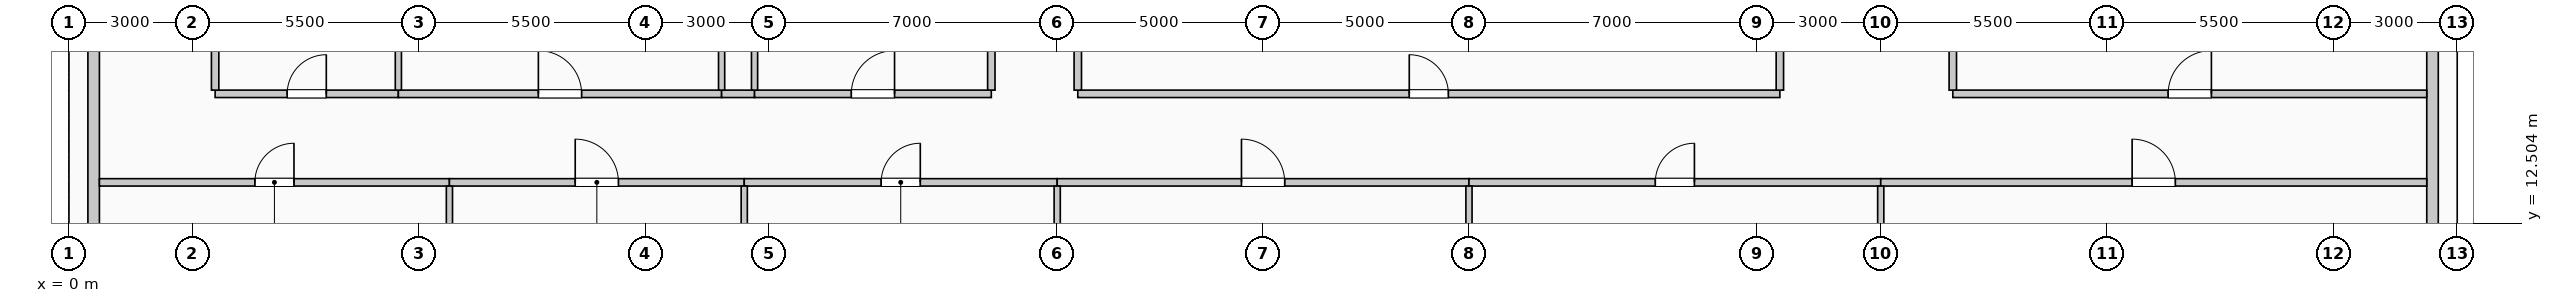
"""IFC4 building model, lengths in metres.
Left out: names, types, materials, properties, quantities, classifications, styles, units other than length and angle.
Written with IfcOpenShell. Run it as: python <this file> out.ifc"""

import sys

from ifc_helpers import new_model, si_unit, direction, frame, frame_2d, origin, place, context, subcontext, project, spatial, rectangle, extrude, element, fill, save


model = new_model("IFC4")
c1 = context("Model", 3, precision=1e-05, world=origin(), true_north=direction((0.0, 1.0)))
c2 = subcontext(c1, "Body", "Model", "MODEL_VIEW")
j1 = project(units=[si_unit("LENGTHUNIT", "METRE"), si_unit("PLANEANGLEUNIT", "RADIAN")], contexts=[c1])
p1 = place(None, origin())
s1 = spatial("IfcSite", under=j1, at=p1, CompositionType="ELEMENT")
p2 = place(p1, origin())
s2 = spatial("IfcBuilding", under=s1, at=p2, CompositionType="ELEMENT")
p3 = place(p2, frame((0.0, 0.0, 132.6)))
s3 = spatial("IfcBuildingStorey", under=s2, at=p3, CompositionType="ELEMENT", Elevation=132.6)
for number, where, z_axis, x_axis in (
    (1, (0.6, 10.445, 0.0), (0.0, 0.0, 1.0), (0.0, 1.0, 0.0)),
    (2, (57.4, 17.555, 0.0), (0.0, 0.0, 1.0), (0.0, -1.0, 0.0)),
):
    element("IfcWall", number, at=place(p3, frame(where, z_axis=z_axis, x_axis=x_axis)), inside=s3, PredefinedType="SOLIDWALL", context=c2, shape_type="SweptSolid", body=[
        extrude(rectangle(XDim=7.11, YDim=0.28, at=frame_2d((3.555, 0.0))), origin(), (0.0, 0.0, 1.0), 2.875),
    ])
p4 = place(p3, frame((0.74, 13.5, 0.0), z_axis=(0.0, 0.0, 1.0), x_axis=(1.0, 0.0, 0.0)))
e3 = element("IfcWall", 3, at=p4, inside=s3, PredefinedType="PARTITIONING", context=c2, shape_type="SweptSolid", body=[
    extrude(rectangle(XDim=8.5, YDim=0.18, at=frame_2d((4.25, 0.0))), origin(), (0.0, 0.0, 1.0), 3.725),
])
p5 = place(p4, frame((3.775, 0.0, 0.0)))
e4 = element("IfcOpeningElement", 4, at=p5, cuts=e3, PredefinedType="OPENING", context=c2, shape_type="SweptSolid", body=[
    extrude(rectangle(XDim=0.95, YDim=2.15, at=frame_2d((0.475, 1.075))), frame((0.0, 0.1, 0.0), z_axis=(0.0, -1.0, 0.0), x_axis=(1.0, 0.0, 0.0)), (0.0, 0.0, 1.0), 0.2),
])
p6 = place(p3, frame((9.24, 13.5, 0.0), z_axis=(0.0, 0.0, 1.0), x_axis=(1.0, 0.0, 0.0)))
e5 = element("IfcWall", 5, at=p6, inside=s3, PredefinedType="PARTITIONING", context=c2, shape_type="SweptSolid", body=[
    extrude(rectangle(XDim=7.16, YDim=0.18, at=frame_2d((3.58, 0.0))), origin(), (0.0, 0.0, 1.0), 3.725),
])
p7 = place(p6, frame((3.055, 0.0, 0.0)))
e6 = element("IfcOpeningElement", 6, at=p7, cuts=e5, PredefinedType="OPENING", context=c2, shape_type="SweptSolid", body=[
    extrude(rectangle(XDim=1.05, YDim=2.15, at=frame_2d((0.525, 1.075))), frame((0.0, 0.1, 0.0), z_axis=(0.0, -1.0, 0.0), x_axis=(1.0, 0.0, 0.0)), (0.0, 0.0, 1.0), 0.2),
])
p8 = place(p3, frame((16.4, 13.5, 0.0), z_axis=(0.0, 0.0, 1.0), x_axis=(1.0, 0.0, 0.0)))
e7 = element("IfcWall", 7, at=p8, inside=s3, PredefinedType="PARTITIONING", context=c2, shape_type="SweptSolid", body=[
    extrude(rectangle(XDim=7.6, YDim=0.18, at=frame_2d((3.8, 0.0))), origin(), (0.0, 0.0, 1.0), 3.725),
])
p9 = place(p8, frame((3.325, 0.0, 0.0)))
e8 = element("IfcOpeningElement", 8, at=p9, cuts=e7, PredefinedType="OPENING", context=c2, shape_type="SweptSolid", body=[
    extrude(rectangle(XDim=0.95, YDim=2.15, at=frame_2d((0.475, 1.075))), frame((0.0, 0.1, 0.0), z_axis=(0.0, -1.0, 0.0), x_axis=(1.0, 0.0, 0.0)), (0.0, 0.0, 1.0), 0.2),
])
p10 = place(p3, frame((24.0, 13.5, 0.0), z_axis=(0.0, 0.0, 1.0), x_axis=(1.0, 0.0, 0.0)))
e9 = element("IfcWall", 9, at=p10, inside=s3, PredefinedType="PARTITIONING", context=c2, shape_type="SweptSolid", body=[
    extrude(rectangle(XDim=10.0, YDim=0.18, at=frame_2d((5.0, 0.0))), origin(), (0.0, 0.0, 1.0), 3.725),
])
p11 = place(p10, frame((4.475, 0.0, 0.0)))
e10 = element("IfcOpeningElement", 10, at=p11, cuts=e9, PredefinedType="OPENING", context=c2, shape_type="SweptSolid", body=[
    extrude(rectangle(XDim=1.05, YDim=2.15, at=frame_2d((0.525, 1.075))), frame((0.0, 0.1, 0.0), z_axis=(0.0, -1.0, 0.0), x_axis=(1.0, 0.0, 0.0)), (0.0, 0.0, 1.0), 0.2),
])
p12 = place(p3, frame((34.0, 13.5, 0.0), z_axis=(0.0, 0.0, 1.0), x_axis=(1.0, 0.0, 0.0)))
e11 = element("IfcWall", 11, at=p12, inside=s3, PredefinedType="PARTITIONING", context=c2, shape_type="SweptSolid", body=[
    extrude(rectangle(XDim=10.0, YDim=0.18, at=frame_2d((5.0, 0.0))), origin(), (0.0, 0.0, 1.0), 3.725),
])
p13 = place(p12, frame((4.525, 0.0, 0.0)))
e12 = element("IfcOpeningElement", 12, at=p13, cuts=e11, PredefinedType="OPENING", context=c2, shape_type="SweptSolid", body=[
    extrude(rectangle(XDim=0.95, YDim=2.15, at=frame_2d((0.475, 1.075))), frame((0.0, 0.1, 0.0), z_axis=(0.0, -1.0, 0.0), x_axis=(1.0, 0.0, 0.0)), (0.0, 0.0, 1.0), 0.2),
])
p14 = place(p3, frame((44.0, 13.5, 0.0), z_axis=(0.0, 0.0, 1.0), x_axis=(1.0, 0.0, 0.0)))
e13 = element("IfcWall", 13, at=p14, inside=s3, PredefinedType="PARTITIONING", context=c2, shape_type="SweptSolid", body=[
    extrude(rectangle(XDim=13.26, YDim=0.18, at=frame_2d((6.63, 0.0))), origin(), (0.0, 0.0, 1.0), 3.725),
])
p15 = place(p14, frame((6.105, 0.0, 0.0)))
e14 = element("IfcOpeningElement", 14, at=p15, cuts=e13, PredefinedType="OPENING", context=c2, shape_type="SweptSolid", body=[
    extrude(rectangle(XDim=1.05, YDim=2.15, at=frame_2d((0.525, 1.075))), frame((0.0, 0.1, 0.0), z_axis=(0.0, -1.0, 0.0), x_axis=(1.0, 0.0, 0.0)), (0.0, 0.0, 1.0), 0.2),
])
p16 = place(p3, frame((3.55, 15.65, 0.0), z_axis=(0.0, 0.0, 1.0), x_axis=(1.0, 0.0, 0.0)))
e15 = element("IfcWall", 15, at=p16, inside=s3, PredefinedType="PARTITIONING", context=c2, shape_type="SweptSolid", body=[
    extrude(rectangle(XDim=4.45, YDim=0.18, at=frame_2d((2.225, 0.0))), origin(), (0.0, 0.0, 1.0), 3.725),
])
p17 = place(p16, frame((1.75, 0.0, 0.0)))
e16 = element("IfcOpeningElement", 16, at=p17, cuts=e15, PredefinedType="OPENING", context=c2, shape_type="SweptSolid", body=[
    extrude(rectangle(XDim=0.95, YDim=2.15, at=frame_2d((0.475, 1.075))), frame((0.0, 0.1, 0.0), z_axis=(0.0, -1.0, 0.0), x_axis=(1.0, 0.0, 0.0)), (0.0, 0.0, 1.0), 0.2),
])
p18 = place(p3, frame((8.0, 15.65, 0.0), z_axis=(0.0, 0.0, 1.0), x_axis=(1.0, 0.0, 0.0)))
e17 = element("IfcWall", 17, at=p18, inside=s3, PredefinedType="PARTITIONING", context=c2, shape_type="SweptSolid", body=[
    extrude(rectangle(XDim=7.85, YDim=0.18, at=frame_2d((3.925, 0.0))), origin(), (0.0, 0.0, 1.0), 3.725),
])
p19 = place(p18, frame((3.4, 0.0, 0.0)))
e18 = element("IfcOpeningElement", 18, at=p19, cuts=e17, PredefinedType="OPENING", context=c2, shape_type="SweptSolid", body=[
    extrude(rectangle(XDim=1.05, YDim=2.15, at=frame_2d((0.525, 1.075))), frame((0.0, 0.1, 0.0), z_axis=(0.0, -1.0, 0.0), x_axis=(1.0, 0.0, 0.0)), (0.0, 0.0, 1.0), 0.2),
])
p20 = place(p3, frame((15.85, 15.65, 0.0), z_axis=(0.0, 0.0, 1.0), x_axis=(1.0, 0.0, 0.0)))
e19 = element("IfcWall", 19, at=p20, inside=s3, PredefinedType="PARTITIONING", context=c2, shape_type="SweptSolid", body=[
    extrude(rectangle(XDim=0.8, YDim=0.18, at=frame_2d((0.4, 0.0))), origin(), (0.0, 0.0, 1.0), 3.725),
])
p21 = place(p3, frame((16.65, 15.65, 0.0), z_axis=(0.0, 0.0, 1.0), x_axis=(1.0, 0.0, 0.0)))
e20 = element("IfcWall", 20, at=p21, inside=s3, PredefinedType="PARTITIONING", context=c2, shape_type="SweptSolid", body=[
    extrude(rectangle(XDim=5.75, YDim=0.18, at=frame_2d((2.875, 0.0))), origin(), (0.0, 0.0, 1.0), 3.725),
])
p22 = place(p21, frame((2.35, 0.0, 0.0)))
e21 = element("IfcOpeningElement", 21, at=p22, cuts=e20, PredefinedType="OPENING", context=c2, shape_type="SweptSolid", body=[
    extrude(rectangle(XDim=1.05, YDim=2.15, at=frame_2d((0.525, 1.075))), frame((0.0, 0.1, 0.0), z_axis=(0.0, -1.0, 0.0), x_axis=(1.0, 0.0, 0.0)), (0.0, 0.0, 1.0), 0.2),
])
p23 = place(p3, frame((24.5, 15.65, 0.0), z_axis=(0.0, 0.0, 1.0), x_axis=(1.0, 0.0, 0.0)))
e22 = element("IfcWall", 22, at=p23, inside=s3, PredefinedType="PARTITIONING", context=c2, shape_type="SweptSolid", body=[
    extrude(rectangle(XDim=17.05, YDim=0.18, at=frame_2d((8.525, 0.0))), origin(), (0.0, 0.0, 1.0), 3.725),
])
p24 = place(p23, frame((8.05, 0.0, 0.0)))
e23 = element("IfcOpeningElement", 23, at=p24, cuts=e22, PredefinedType="OPENING", context=c2, shape_type="SweptSolid", body=[
    extrude(rectangle(XDim=0.95, YDim=2.15, at=frame_2d((0.475, 1.075))), frame((0.0, 0.1, 0.0), z_axis=(0.0, -1.0, 0.0), x_axis=(1.0, 0.0, 0.0)), (0.0, 0.0, 1.0), 0.2),
])
p25 = place(p3, frame((45.75, 15.65, 0.0), z_axis=(0.0, 0.0, 1.0), x_axis=(1.0, 0.0, 0.0)))
e24 = element("IfcWall", 24, at=p25, inside=s3, PredefinedType="PARTITIONING", context=c2, shape_type="SweptSolid", body=[
    extrude(rectangle(XDim=11.51, YDim=0.18, at=frame_2d((5.755, 0.0))), origin(), (0.0, 0.0, 1.0), 3.725),
])
p26 = place(p25, frame((5.23, 0.0, 0.0)))
e25 = element("IfcOpeningElement", 25, at=p26, cuts=e24, PredefinedType="OPENING", context=c2, shape_type="SweptSolid", body=[
    extrude(rectangle(XDim=1.05, YDim=2.15, at=frame_2d((0.525, 1.075))), frame((0.0, 0.1, 0.0), z_axis=(0.0, -1.0, 0.0), x_axis=(1.0, 0.0, 0.0)), (0.0, 0.0, 1.0), 0.2),
])
p27 = place(p3, frame((3.55, 15.74, 0.0), z_axis=(0.0, 0.0, 1.0), x_axis=(0.0, 1.0, 0.0)))
e26 = element("IfcWall", 26, at=p27, inside=s3, PredefinedType="PARTITIONING", context=c2, shape_type="SweptSolid", body=[
    extrude(rectangle(XDim=3.135, YDim=0.18, at=frame_2d((1.567, 0.0))), origin(), (0.0, 0.0, 1.0), 3.725),
])
p28 = place(p3, frame((8.0, 15.74, 0.0), z_axis=(0.0, 0.0, 1.0), x_axis=(0.0, 1.0, 0.0)))
e27 = element("IfcWall", 27, at=p28, inside=s3, PredefinedType="PARTITIONING", context=c2, shape_type="SweptSolid", body=[
    extrude(rectangle(XDim=3.135, YDim=0.15, at=frame_2d((1.567, 0.0))), origin(), (0.0, 0.0, 1.0), 3.725),
])
p29 = place(p3, frame((9.24, 0.74, 0.0), z_axis=(0.0, 0.0, 1.0), x_axis=(0.0, 1.0, 0.0)))
e28 = element("IfcWall", 28, at=p29, inside=s3, PredefinedType="PARTITIONING", context=c2, shape_type="SweptSolid", body=[
    extrude(rectangle(XDim=12.67, YDim=0.15, at=frame_2d((6.335, 0.0))), origin(), (0.0, 0.0, 1.0), 3.725),
])
p30 = place(p3, frame((15.85, 15.74, 0.0), z_axis=(0.0, 0.0, 1.0), x_axis=(0.0, 1.0, 0.0)))
e29 = element("IfcWall", 29, at=p30, inside=s3, PredefinedType="PARTITIONING", context=c2, shape_type="SweptSolid", body=[
    extrude(rectangle(XDim=1.76, YDim=0.15, at=frame_2d((0.88, 0.0))), origin(), (0.0, 0.0, 1.0), 3.725),
])
p31 = place(p3, frame((16.4, 1.3, 0.0), z_axis=(0.0, 0.0, 1.0), x_axis=(0.0, 1.0, 0.0)))
e30 = element("IfcWall", 30, at=p31, inside=s3, PredefinedType="PARTITIONING", context=c2, shape_type="SweptSolid", body=[
    extrude(rectangle(XDim=12.11, YDim=0.15, at=frame_2d((6.055, 0.0))), origin(), (0.0, 0.0, 1.0), 3.07),
])
p32 = place(p3, frame((16.65, 15.74, 0.0), z_axis=(0.0, 0.0, 1.0), x_axis=(0.0, 1.0, 0.0)))
e31 = element("IfcWall", 31, at=p32, inside=s3, PredefinedType="PARTITIONING", context=c2, shape_type="SweptSolid", body=[
    extrude(rectangle(XDim=1.76, YDim=0.15, at=frame_2d((0.88, 0.0))), origin(), (0.0, 0.0, 1.0), 3.07),
])
p33 = place(p3, frame((22.4, 15.74, 0.0), z_axis=(0.0, 0.0, 1.0), x_axis=(0.0, 1.0, 0.0)))
e32 = element("IfcWall", 32, at=p33, inside=s3, PredefinedType="PARTITIONING", context=c2, shape_type="SweptSolid", body=[
    extrude(rectangle(XDim=13.985, YDim=0.18, at=frame_2d((6.993, 0.0))), origin(), (0.0, 0.0, 1.0), 3.725),
])
p34 = place(p3, frame((24.0, 1.3, 0.0), z_axis=(0.0, 0.0, 1.0), x_axis=(0.0, 1.0, 0.0)))
e33 = element("IfcWall", 33, at=p34, inside=s3, PredefinedType="PARTITIONING", context=c2, shape_type="SweptSolid", body=[
    extrude(rectangle(XDim=12.11, YDim=0.15, at=frame_2d((6.055, 0.0))), origin(), (0.0, 0.0, 1.0), 3.725),
])
p35 = place(p3, frame((24.5, 15.74, 0.0), z_axis=(0.0, 0.0, 1.0), x_axis=(0.0, 1.0, 0.0)))
e34 = element("IfcWall", 34, at=p35, inside=s3, PredefinedType="PARTITIONING", context=c2, shape_type="SweptSolid", body=[
    extrude(rectangle(XDim=15.97, YDim=0.18, at=frame_2d((7.985, 0.0))), origin(), (0.0, 0.0, 1.0), 3.725),
])
p36 = place(p3, frame((34.0, 1.3, 0.0), z_axis=(0.0, 0.0, 1.0), x_axis=(0.0, 1.0, 0.0)))
e35 = element("IfcWall", 35, at=p36, inside=s3, PredefinedType="PARTITIONING", context=c2, shape_type="SweptSolid", body=[
    extrude(rectangle(XDim=12.11, YDim=0.15, at=frame_2d((6.055, 0.0))), origin(), (0.0, 0.0, 1.0), 3.725),
])
p37 = place(p3, frame((41.55, 15.74, 0.0), z_axis=(0.0, 0.0, 1.0), x_axis=(0.0, 1.0, 0.0)))
e36 = element("IfcWall", 36, at=p37, inside=s3, PredefinedType="PARTITIONING", context=c2, shape_type="SweptSolid", body=[
    extrude(rectangle(XDim=1.76, YDim=0.18, at=frame_2d((0.88, 0.0))), origin(), (0.0, 0.0, 1.0), 3.07),
])
p38 = place(p3, frame((44.0, 1.175, 0.0), z_axis=(0.0, 0.0, 1.0), x_axis=(0.0, 1.0, 0.0)))
e37 = element("IfcWall", 37, at=p38, inside=s3, PredefinedType="PARTITIONING", context=c2, shape_type="SweptSolid", body=[
    extrude(rectangle(XDim=12.235, YDim=0.15, at=frame_2d((6.117, 0.0))), origin(), (0.0, 0.0, 1.0), 3.725),
])
p39 = place(p3, frame((45.75, 15.74, 0.0), z_axis=(0.0, 0.0, 1.0), x_axis=(0.0, 1.0, 0.0)))
e38 = element("IfcWall", 38, at=p39, inside=s3, PredefinedType="PARTITIONING", context=c2, shape_type="SweptSolid", body=[
    extrude(rectangle(XDim=16.535, YDim=0.18, at=frame_2d((8.268, 0.0))), origin(), (0.0, 0.0, 1.0), 3.725),
])
p40 = place(p5, origin())
e39 = element("IfcDoor", 39, at=p40, inside=s3, OperationType="SINGLE_SWING_RIGHT", PredefinedType="DOOR", context=c2, shape_type="SweptSolid", body=[
    extrude(rectangle(XDim=0.95, YDim=2.15, at=frame_2d((0.475, 1.075))), frame((0.0, 0.025, 0.0), z_axis=(0.0, -1.0, 0.0), x_axis=(1.0, 0.0, 0.0)), (0.0, 0.0, 1.0), 0.05),
])
fill(e4, e39)
p41 = place(p7, origin())
e40 = element("IfcDoor", 40, at=p41, inside=s3, OperationType="SINGLE_SWING_LEFT", PredefinedType="DOOR", context=c2, shape_type="SweptSolid", body=[
    extrude(rectangle(XDim=1.05, YDim=2.15, at=frame_2d((0.525, 1.075))), frame((0.0, 0.025, 0.0), z_axis=(0.0, -1.0, 0.0), x_axis=(1.0, 0.0, 0.0)), (0.0, 0.0, 1.0), 0.05),
])
fill(e6, e40)
p42 = place(p9, origin())
e41 = element("IfcDoor", 41, at=p42, inside=s3, OperationType="SINGLE_SWING_RIGHT", PredefinedType="DOOR", context=c2, shape_type="SweptSolid", body=[
    extrude(rectangle(XDim=0.95, YDim=2.15, at=frame_2d((0.475, 1.075))), frame((0.0, 0.025, 0.0), z_axis=(0.0, -1.0, 0.0), x_axis=(1.0, 0.0, 0.0)), (0.0, 0.0, 1.0), 0.05),
])
fill(e8, e41)
p43 = place(p11, origin())
e42 = element("IfcDoor", 42, at=p43, inside=s3, OperationType="SINGLE_SWING_LEFT", PredefinedType="DOOR", context=c2, shape_type="SweptSolid", body=[
    extrude(rectangle(XDim=1.05, YDim=2.15, at=frame_2d((0.525, 1.075))), frame((0.0, 0.025, 0.0), z_axis=(0.0, -1.0, 0.0), x_axis=(1.0, 0.0, 0.0)), (0.0, 0.0, 1.0), 0.05),
])
fill(e10, e42)
p44 = place(p13, origin())
e43 = element("IfcDoor", 43, at=p44, inside=s3, OperationType="SINGLE_SWING_RIGHT", PredefinedType="DOOR", context=c2, shape_type="SweptSolid", body=[
    extrude(rectangle(XDim=0.95, YDim=2.15, at=frame_2d((0.475, 1.075))), frame((0.0, 0.025, 0.0), z_axis=(0.0, -1.0, 0.0), x_axis=(1.0, 0.0, 0.0)), (0.0, 0.0, 1.0), 0.05),
])
fill(e12, e43)
p45 = place(p15, origin())
e44 = element("IfcDoor", 44, at=p45, inside=s3, OperationType="SINGLE_SWING_LEFT", PredefinedType="DOOR", context=c2, shape_type="SweptSolid", body=[
    extrude(rectangle(XDim=1.05, YDim=2.15, at=frame_2d((0.525, 1.075))), frame((0.0, 0.025, 0.0), z_axis=(0.0, -1.0, 0.0), x_axis=(1.0, 0.0, 0.0)), (0.0, 0.0, 1.0), 0.05),
])
fill(e14, e44)
p46 = place(p17, origin())
e45 = element("IfcDoor", 45, at=p46, inside=s3, OperationType="SINGLE_SWING_RIGHT", PredefinedType="DOOR", context=c2, shape_type="SweptSolid", body=[
    extrude(rectangle(XDim=0.95, YDim=2.15, at=frame_2d((0.475, 1.075))), frame((0.0, 0.025, 0.0), z_axis=(0.0, -1.0, 0.0), x_axis=(1.0, 0.0, 0.0)), (0.0, 0.0, 1.0), 0.05),
])
fill(e16, e45)
p47 = place(p19, origin())
e46 = element("IfcDoor", 46, at=p47, inside=s3, OperationType="SINGLE_SWING_LEFT", PredefinedType="DOOR", context=c2, shape_type="SweptSolid", body=[
    extrude(rectangle(XDim=1.05, YDim=2.15, at=frame_2d((0.525, 1.075))), frame((0.0, 0.025, 0.0), z_axis=(0.0, -1.0, 0.0), x_axis=(1.0, 0.0, 0.0)), (0.0, 0.0, 1.0), 0.05),
])
fill(e18, e46)
p48 = place(p22, origin())
e47 = element("IfcDoor", 47, at=p48, inside=s3, OperationType="SINGLE_SWING_RIGHT", PredefinedType="DOOR", context=c2, shape_type="SweptSolid", body=[
    extrude(rectangle(XDim=1.05, YDim=2.15, at=frame_2d((0.525, 1.075))), frame((0.0, 0.025, 0.0), z_axis=(0.0, -1.0, 0.0), x_axis=(1.0, 0.0, 0.0)), (0.0, 0.0, 1.0), 0.05),
])
fill(e21, e47)
p49 = place(p24, origin())
e48 = element("IfcDoor", 48, at=p49, inside=s3, OperationType="SINGLE_SWING_LEFT", PredefinedType="DOOR", context=c2, shape_type="SweptSolid", body=[
    extrude(rectangle(XDim=0.95, YDim=2.15, at=frame_2d((0.475, 1.075))), frame((0.0, 0.025, 0.0), z_axis=(0.0, -1.0, 0.0), x_axis=(1.0, 0.0, 0.0)), (0.0, 0.0, 1.0), 0.05),
])
fill(e23, e48)
p50 = place(p26, origin())
e49 = element("IfcDoor", 49, at=p50, inside=s3, OperationType="SINGLE_SWING_RIGHT", PredefinedType="DOOR", context=c2, shape_type="SweptSolid", body=[
    extrude(rectangle(XDim=1.05, YDim=2.15, at=frame_2d((0.525, 1.075))), frame((0.0, 0.025, 0.0), z_axis=(0.0, -1.0, 0.0), x_axis=(1.0, 0.0, 0.0)), (0.0, 0.0, 1.0), 0.05),
])
fill(e25, e49)
save(model, sys.argv[1])
